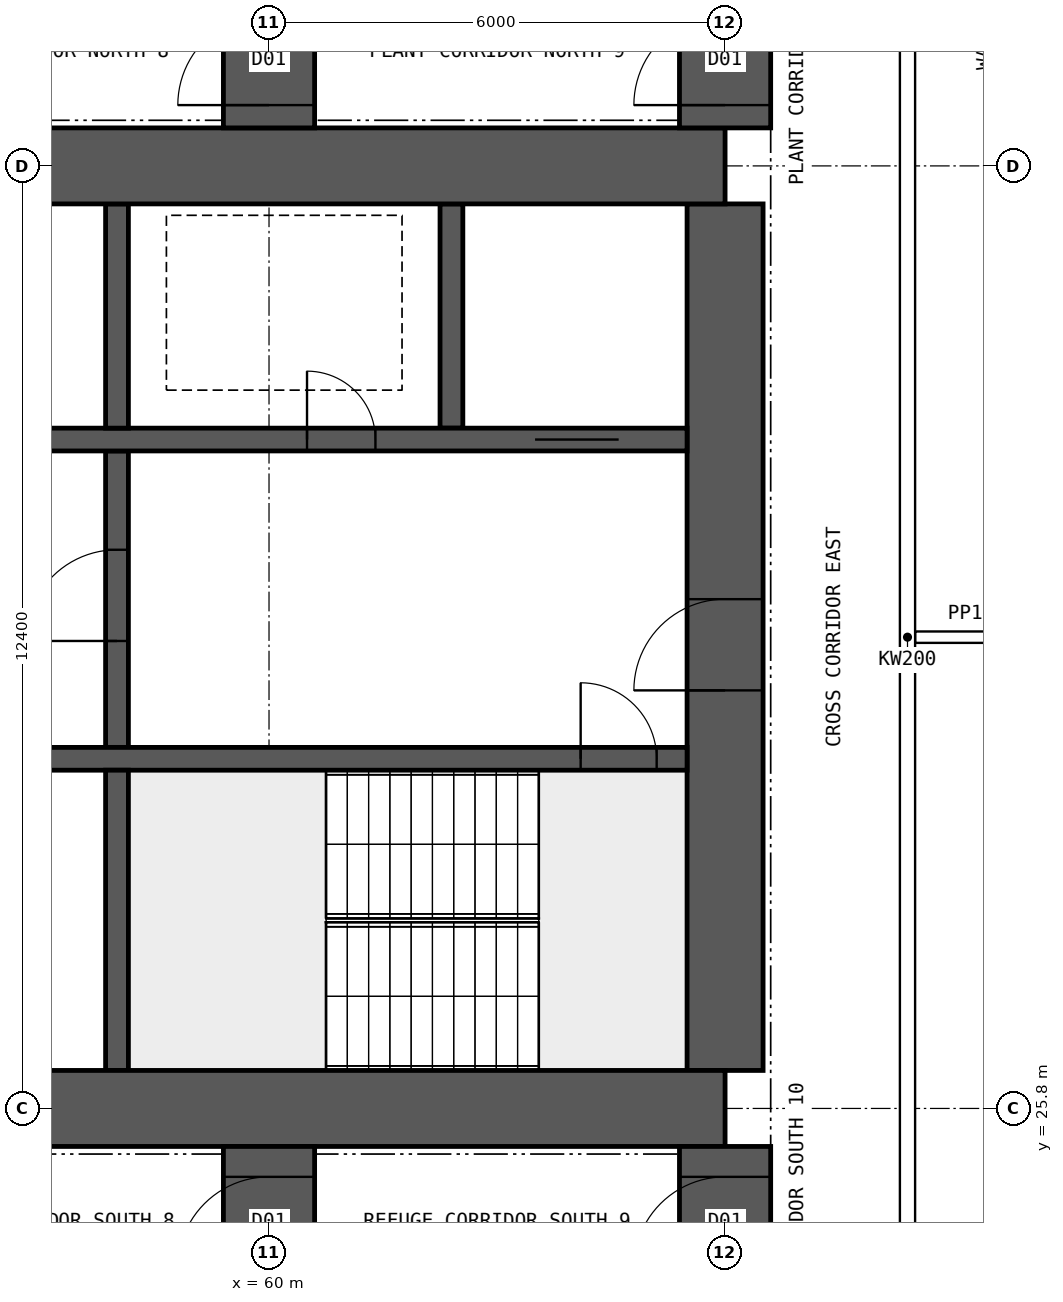
"""IFC4 building model, lengths in metres.
Left out: names, types, materials, properties, quantities, classifications, styles, units other than length and angle.
Written with IfcOpenShell. Run it as: python <this file> out.ifc"""

import sys

from ifc_helpers import new_model, si_unit, direction, frame, frame_2d, origin, place, context, subcontext, project, spatial, rectangle, extrude, element, fill, save


model = new_model("IFC4")
c1 = context("Model", 3, precision=1e-05, world=origin(), true_north=direction((0.0, 1.0)))
c2 = subcontext(c1, "Body", "Model", "MODEL_VIEW")
j1 = project(units=[si_unit("LENGTHUNIT", "METRE"), si_unit("PLANEANGLEUNIT", "RADIAN")], contexts=[c1])
p1 = place(None, origin())
s1 = spatial("IfcSite", under=j1, at=p1, CompositionType="ELEMENT")
p2 = place(p1, origin())
s2 = spatial("IfcBuilding", under=s1, at=p2, CompositionType="ELEMENT")
p3 = place(p2, frame((0.0, 0.0, 68.95)))
s3 = spatial("IfcBuildingStorey", under=s2, at=p3, CompositionType="ELEMENT", Elevation=68.95)
for number, where, z_axis, x_axis in (
    (1, (18.0, 25.8, 0.0), (0.0, 0.0, 1.0), (1.0, 0.0, 0.0)),
    (2, (18.0, 38.2, 0.0), (0.0, 0.0, 1.0), (1.0, 0.0, 0.0)),
):
    element("IfcWall", number, at=place(p3, frame(where, z_axis=z_axis, x_axis=x_axis)), inside=s3, PredefinedType="SHEAR", context=c2, shape_type="SweptSolid", body=[
        extrude(rectangle(XDim=48.0, YDim=1.0, at=frame_2d((24.0, 0.0))), origin(), (0.0, 0.0, 1.0), 7.2),
    ])
p4 = place(p3, frame((66.0, 26.3, 0.0), z_axis=(0.0, 0.0, 1.0), x_axis=(0.0, 1.0, 0.0)))
e3 = element("IfcWall", 3, at=p4, inside=s3, PredefinedType="SHEAR", context=c2, shape_type="SweptSolid", body=[
    extrude(rectangle(XDim=11.4, YDim=1.0, at=frame_2d((5.7, 0.0))), origin(), (0.0, 0.0, 1.0), 7.2),
])
p5 = place(p4, frame((5.0, 0.0, 0.0)))
e4 = element("IfcOpeningElement", 4, at=p5, cuts=e3, PredefinedType="OPENING", context=c2, shape_type="SweptSolid", body=[
    extrude(rectangle(XDim=1.2, YDim=2.1, at=frame_2d((0.6, 1.05))), frame((0.0, 0.51, 0.0), z_axis=(0.0, -1.0, 0.0), x_axis=(1.0, 0.0, 0.0)), (0.0, 0.0, 1.0), 1.02),
])
p6 = place(p3, frame((18.5, 30.4, 0.0), z_axis=(0.0, 0.0, 1.0), x_axis=(1.0, 0.0, 0.0)))
e5 = element("IfcWall", 5, at=p6, inside=s3, PredefinedType="SHEAR", context=c2, shape_type="SweptSolid", body=[
    extrude(rectangle(XDim=47.0, YDim=0.3, at=frame_2d((23.5, 0.0))), origin(), (0.0, 0.0, 1.0), 7.2),
])
p7 = place(p6, frame((0.4, 0.0, 0.0)))
e6 = element("IfcOpeningElement", 6, at=p7, cuts=e5, PredefinedType="OPENING", context=c2, shape_type="SweptSolid", body=[
    extrude(rectangle(XDim=1.0, YDim=2.1, at=frame_2d((0.5, 1.05))), frame((0.0, 0.16, 0.0), z_axis=(0.0, -1.0, 0.0), x_axis=(1.0, 0.0, 0.0)), (0.0, 0.0, 1.0), 0.32),
])
p8 = place(p6, frame((45.6, 0.0, 0.0)))
e7 = element("IfcOpeningElement", 7, at=p8, cuts=e5, PredefinedType="OPENING", context=c2, shape_type="SweptSolid", body=[
    extrude(rectangle(XDim=1.0, YDim=2.1, at=frame_2d((0.5, 1.05))), frame((0.0, 0.16, 0.0), z_axis=(0.0, -1.0, 0.0), x_axis=(1.0, 0.0, 0.0)), (0.0, 0.0, 1.0), 0.32),
])
p9 = place(p6, frame((30.117, 0.0, 0.0)))
e8 = element("IfcOpeningElement", 8, at=p9, cuts=e5, PredefinedType="OPENING", context=c2, shape_type="SweptSolid", body=[
    extrude(rectangle(XDim=1.1, YDim=2.1, at=frame_2d((0.55, 1.05))), frame((0.0, 0.16, 0.0), z_axis=(0.0, -1.0, 0.0), x_axis=(1.0, 0.0, 0.0)), (0.0, 0.0, 1.0), 0.32),
])
p10 = place(p6, frame((33.65, 0.0, 0.0)))
e9 = element("IfcOpeningElement", 9, at=p10, cuts=e5, PredefinedType="OPENING", context=c2, shape_type="SweptSolid", body=[
    extrude(rectangle(XDim=1.1, YDim=2.1, at=frame_2d((0.55, 1.05))), frame((0.0, 0.16, 0.0), z_axis=(0.0, -1.0, 0.0), x_axis=(1.0, 0.0, 0.0)), (0.0, 0.0, 1.0), 0.32),
])
p11 = place(p6, frame((37.183, 0.0, 0.0)))
e10 = element("IfcOpeningElement", 10, at=p11, cuts=e5, PredefinedType="OPENING", context=c2, shape_type="SweptSolid", body=[
    extrude(rectangle(XDim=1.1, YDim=2.1, at=frame_2d((0.55, 1.05))), frame((0.0, 0.16, 0.0), z_axis=(0.0, -1.0, 0.0), x_axis=(1.0, 0.0, 0.0)), (0.0, 0.0, 1.0), 0.32),
])
p12 = place(p3, frame((18.5, 34.6, 0.0), z_axis=(0.0, 0.0, 1.0), x_axis=(1.0, 0.0, 0.0)))
e11 = element("IfcWall", 11, at=p12, inside=s3, PredefinedType="SHEAR", context=c2, shape_type="SweptSolid", body=[
    extrude(rectangle(XDim=47.0, YDim=0.3, at=frame_2d((23.5, 0.0))), origin(), (0.0, 0.0, 1.0), 7.2),
])
p13 = place(p12, frame((0.9, 0.0, 0.0)))
e12 = element("IfcOpeningElement", 12, at=p13, cuts=e11, PredefinedType="OPENING", context=c2, shape_type="SweptSolid", body=[
    extrude(rectangle(XDim=1.1, YDim=2.1, at=frame_2d((0.55, 1.05))), frame((0.0, 0.16, 0.0), z_axis=(0.0, -1.0, 0.0), x_axis=(1.0, 0.0, 0.0)), (0.0, 0.0, 1.0), 0.32),
])
p14 = place(p12, frame((45.0, 0.0, 0.0)))
e13 = element("IfcOpeningElement", 13, at=p14, cuts=e11, PredefinedType="OPENING", context=c2, shape_type="SweptSolid", body=[
    extrude(rectangle(XDim=1.1, YDim=2.1, at=frame_2d((0.55, 1.05))), frame((0.0, 0.16, 0.0), z_axis=(0.0, -1.0, 0.0), x_axis=(1.0, 0.0, 0.0)), (0.0, 0.0, 1.0), 0.32),
])
p15 = place(p12, frame((4.1, 0.0, 0.0)))
e14 = element("IfcOpeningElement", 14, at=p15, cuts=e11, PredefinedType="OPENING", context=c2, shape_type="SweptSolid", body=[
    extrude(rectangle(XDim=0.9, YDim=2.1, at=frame_2d((0.45, 1.05))), frame((0.0, 0.16, 0.0), z_axis=(0.0, -1.0, 0.0), x_axis=(1.0, 0.0, 0.0)), (0.0, 0.0, 1.0), 0.32),
])
p16 = place(p12, frame((42.0, 0.0, 0.0)))
e15 = element("IfcOpeningElement", 15, at=p16, cuts=e11, PredefinedType="OPENING", context=c2, shape_type="SweptSolid", body=[
    extrude(rectangle(XDim=0.9, YDim=2.1, at=frame_2d((0.45, 1.05))), frame((0.0, 0.16, 0.0), z_axis=(0.0, -1.0, 0.0), x_axis=(1.0, 0.0, 0.0)), (0.0, 0.0, 1.0), 0.32),
])
p17 = place(p12, frame((8.875, 0.0, 0.0)))
e16 = element("IfcOpeningElement", 16, at=p17, cuts=e11, PredefinedType="OPENING", context=c2, shape_type="SweptSolid", body=[
    extrude(rectangle(XDim=0.9, YDim=2.1, at=frame_2d((0.45, 1.05))), frame((0.0, 0.16, 0.0), z_axis=(0.0, -1.0, 0.0), x_axis=(1.0, 0.0, 0.0)), (0.0, 0.0, 1.0), 0.32),
])
p18 = place(p12, frame((12.849, 0.0, 0.0)))
e17 = element("IfcOpeningElement", 17, at=p18, cuts=e11, PredefinedType="OPENING", context=c2, shape_type="SweptSolid", body=[
    extrude(rectangle(XDim=0.9, YDim=2.1, at=frame_2d((0.45, 1.05))), frame((0.0, 0.16, 0.0), z_axis=(0.0, -1.0, 0.0), x_axis=(1.0, 0.0, 0.0)), (0.0, 0.0, 1.0), 0.32),
])
p19 = place(p12, frame((16.496, 0.0, 0.0)))
e18 = element("IfcOpeningElement", 18, at=p19, cuts=e11, PredefinedType="OPENING", context=c2, shape_type="SweptSolid", body=[
    extrude(rectangle(XDim=0.9, YDim=2.1, at=frame_2d((0.45, 1.05))), frame((0.0, 0.16, 0.0), z_axis=(0.0, -1.0, 0.0), x_axis=(1.0, 0.0, 0.0)), (0.0, 0.0, 1.0), 0.32),
])
p20 = place(p12, frame((20.255, 0.0, 0.0)))
e19 = element("IfcOpeningElement", 19, at=p20, cuts=e11, PredefinedType="OPENING", context=c2, shape_type="SweptSolid", body=[
    extrude(rectangle(XDim=0.9, YDim=2.1, at=frame_2d((0.45, 1.05))), frame((0.0, 0.16, 0.0), z_axis=(0.0, -1.0, 0.0), x_axis=(1.0, 0.0, 0.0)), (0.0, 0.0, 1.0), 0.32),
])
p21 = place(p12, frame((24.661, 0.0, 0.0)))
e20 = element("IfcOpeningElement", 20, at=p21, cuts=e11, PredefinedType="OPENING", context=c2, shape_type="SweptSolid", body=[
    extrude(rectangle(XDim=0.9, YDim=2.1, at=frame_2d((0.45, 1.05))), frame((0.0, 0.16, 0.0), z_axis=(0.0, -1.0, 0.0), x_axis=(1.0, 0.0, 0.0)), (0.0, 0.0, 1.0), 0.32),
])
p22 = place(p12, frame((27.458, 0.0, 0.0)))
e21 = element("IfcOpeningElement", 21, at=p22, cuts=e11, PredefinedType="OPENING", context=c2, shape_type="SweptSolid", body=[
    extrude(rectangle(XDim=0.9, YDim=2.1, at=frame_2d((0.45, 1.05))), frame((0.0, 0.16, 0.0), z_axis=(0.0, -1.0, 0.0), x_axis=(1.0, 0.0, 0.0)), (0.0, 0.0, 1.0), 0.32),
])
p23 = place(p12, frame((29.831, 0.0, 0.0)))
e22 = element("IfcOpeningElement", 22, at=p23, cuts=e11, PredefinedType="OPENING", context=c2, shape_type="SweptSolid", body=[
    extrude(rectangle(XDim=0.9, YDim=2.1, at=frame_2d((0.45, 1.05))), frame((0.0, 0.16, 0.0), z_axis=(0.0, -1.0, 0.0), x_axis=(1.0, 0.0, 0.0)), (0.0, 0.0, 1.0), 0.32),
])
p24 = place(p12, frame((33.68, 0.0, 0.0)))
e23 = element("IfcOpeningElement", 23, at=p24, cuts=e11, PredefinedType="OPENING", context=c2, shape_type="SweptSolid", body=[
    extrude(rectangle(XDim=0.9, YDim=2.1, at=frame_2d((0.45, 1.05))), frame((0.0, 0.16, 0.0), z_axis=(0.0, -1.0, 0.0), x_axis=(1.0, 0.0, 0.0)), (0.0, 0.0, 1.0), 0.32),
])
p25 = place(p12, frame((37.429, 0.0, 0.0)))
e24 = element("IfcOpeningElement", 24, at=p25, cuts=e11, PredefinedType="OPENING", context=c2, shape_type="SweptSolid", body=[
    extrude(rectangle(XDim=0.9, YDim=2.1, at=frame_2d((0.45, 1.05))), frame((0.0, 0.16, 0.0), z_axis=(0.0, -1.0, 0.0), x_axis=(1.0, 0.0, 0.0)), (0.0, 0.0, 1.0), 0.32),
])
p26 = place(p3, frame((58.0, 26.3, 0.0), z_axis=(0.0, 0.0, 1.0), x_axis=(0.0, 1.0, 0.0)))
e25 = element("IfcWall", 25, at=p26, inside=s3, PredefinedType="SHEAR", context=c2, shape_type="SweptSolid", body=[
    extrude(rectangle(XDim=3.95, YDim=0.3, at=frame_2d((1.975, 0.0))), origin(), (0.0, 0.0, 1.0), 7.2),
])
p27 = place(p3, frame((58.0, 30.55, 0.0), z_axis=(0.0, 0.0, 1.0), x_axis=(0.0, 1.0, 0.0)))
e26 = element("IfcWall", 26, at=p27, inside=s3, PredefinedType="SHEAR", context=c2, shape_type="SweptSolid", body=[
    extrude(rectangle(XDim=3.9, YDim=0.3, at=frame_2d((1.95, 0.0))), origin(), (0.0, 0.0, 1.0), 7.2),
])
p28 = place(p27, frame((1.4, 0.0, 0.0)))
e27 = element("IfcOpeningElement", 27, at=p28, cuts=e26, PredefinedType="OPENING", context=c2, shape_type="SweptSolid", body=[
    extrude(rectangle(XDim=1.2, YDim=2.1, at=frame_2d((0.6, 1.05))), frame((0.0, 0.16, 0.0), z_axis=(0.0, -1.0, 0.0), x_axis=(1.0, 0.0, 0.0)), (0.0, 0.0, 1.0), 0.32),
])
for number, where, z_axis, x_axis in (
    (28, (62.4, 34.75, 0.0), (0.0, 0.0, 1.0), (0.0, 1.0, 0.0)),
    (29, (58.0, 34.75, 0.0), (0.0, 0.0, 1.0), (0.0, 1.0, 0.0)),
):
    element("IfcWall", number, at=place(p3, frame(where, z_axis=z_axis, x_axis=x_axis)), inside=s3, PredefinedType="SHEAR", context=c2, shape_type="SweptSolid", body=[
        extrude(rectangle(XDim=2.95, YDim=0.3, at=frame_2d((1.475, 0.0))), origin(), (0.0, 0.0, 1.0), 7.2),
    ])
p29 = place(p3, frame((60.0, 7.7, 0.0), z_axis=(0.0, 0.0, 1.0), x_axis=(0.0, 1.0, 0.0)))
e30 = element("IfcWall", 30, at=p29, inside=s3, PredefinedType="SHEAR", context=c2, shape_type="SweptSolid", body=[
    extrude(rectangle(XDim=17.6, YDim=1.2, at=frame_2d((8.8, 0.0))), origin(), (0.0, 0.0, 1.0), 7.2),
])
p30 = place(p29, frame((16.0, 0.0, 0.0)))
e31 = element("IfcOpeningElement", 31, at=p30, cuts=e30, PredefinedType="OPENING", context=c2, shape_type="SweptSolid", body=[
    extrude(rectangle(XDim=1.2, YDim=2.1, at=frame_2d((0.6, 1.05))), frame((0.0, 0.61, 0.0), z_axis=(0.0, -1.0, 0.0), x_axis=(1.0, 0.0, 0.0)), (0.0, 0.0, 1.0), 1.22),
])
p31 = place(p3, frame((60.0, 38.7, 0.0), z_axis=(0.0, 0.0, 1.0), x_axis=(0.0, 1.0, 0.0)))
e32 = element("IfcWall", 32, at=p31, inside=s3, PredefinedType="SHEAR", context=c2, shape_type="SweptSolid", body=[
    extrude(rectangle(XDim=17.6, YDim=1.2, at=frame_2d((8.8, 0.0))), origin(), (0.0, 0.0, 1.0), 7.2),
])
p32 = place(p31, frame((0.3, 0.0, 0.0)))
e33 = element("IfcOpeningElement", 33, at=p32, cuts=e32, PredefinedType="OPENING", context=c2, shape_type="SweptSolid", body=[
    extrude(rectangle(XDim=1.2, YDim=2.1, at=frame_2d((0.6, 1.05))), frame((0.0, 0.61, 0.0), z_axis=(0.0, -1.0, 0.0), x_axis=(1.0, 0.0, 0.0)), (0.0, 0.0, 1.0), 1.22),
])
p33 = place(p3, frame((66.0, 7.7, 0.0), z_axis=(0.0, 0.0, 1.0), x_axis=(0.0, 1.0, 0.0)))
e34 = element("IfcWall", 34, at=p33, inside=s3, PredefinedType="SHEAR", context=c2, shape_type="SweptSolid", body=[
    extrude(rectangle(XDim=17.6, YDim=1.2, at=frame_2d((8.8, 0.0))), origin(), (0.0, 0.0, 1.0), 7.2),
])
p34 = place(p33, frame((16.0, 0.0, 0.0)))
e35 = element("IfcOpeningElement", 35, at=p34, cuts=e34, PredefinedType="OPENING", context=c2, shape_type="SweptSolid", body=[
    extrude(rectangle(XDim=1.2, YDim=2.1, at=frame_2d((0.6, 1.05))), frame((0.0, 0.61, 0.0), z_axis=(0.0, -1.0, 0.0), x_axis=(1.0, 0.0, 0.0)), (0.0, 0.0, 1.0), 1.22),
])
p35 = place(p3, frame((66.0, 38.7, 0.0), z_axis=(0.0, 0.0, 1.0), x_axis=(0.0, 1.0, 0.0)))
e36 = element("IfcWall", 36, at=p35, inside=s3, PredefinedType="SHEAR", context=c2, shape_type="SweptSolid", body=[
    extrude(rectangle(XDim=17.6, YDim=1.2, at=frame_2d((8.8, 0.0))), origin(), (0.0, 0.0, 1.0), 7.2),
])
p36 = place(p35, frame((0.3, 0.0, 0.0)))
e37 = element("IfcOpeningElement", 37, at=p36, cuts=e36, PredefinedType="OPENING", context=c2, shape_type="SweptSolid", body=[
    extrude(rectangle(XDim=1.2, YDim=2.1, at=frame_2d((0.6, 1.05))), frame((0.0, 0.61, 0.0), z_axis=(0.0, -1.0, 0.0), x_axis=(1.0, 0.0, 0.0)), (0.0, 0.0, 1.0), 1.22),
])
p37 = place(p3, frame((68.4, 23.4, 0.0), z_axis=(0.0, 0.0, 1.0), x_axis=(0.0, 1.0, 0.0)))
e38 = element("IfcWall", 38, at=p37, inside=s3, PredefinedType="SOLIDWALL", context=c2, shape_type="SweptSolid", body=[
    extrude(rectangle(XDim=17.2, YDim=0.2, at=frame_2d((8.6, 0.0))), origin(), (0.0, 0.0, 1.0), 6.9),
])
p38 = place(p3, frame((68.5, 32.0, 0.0), z_axis=(0.0, 0.0, 1.0), x_axis=(1.0, 0.0, 0.0)))
e39 = element("IfcWall", 39, at=p38, inside=s3, PredefinedType="PARTITIONING", context=c2, shape_type="SweptSolid", body=[
    extrude(rectangle(XDim=3.0, YDim=0.15, at=frame_2d((1.5, 0.0))), origin(), (0.0, 0.0, 1.0), 6.9),
])
p39 = place(p5, origin())
e40 = element("IfcDoor", 40, at=p39, inside=s3, OperationType="SINGLE_SWING_LEFT", PredefinedType="DOOR", context=c2, shape_type="SweptSolid", body=[
    extrude(rectangle(XDim=1.2, YDim=2.1, at=frame_2d((0.6, 1.05))), frame((0.0, 0.025, 0.0), z_axis=(0.0, -1.0, 0.0), x_axis=(1.0, 0.0, 0.0)), (0.0, 0.0, 1.0), 0.05),
])
fill(e4, e40)
p40 = place(p8, origin())
e41 = element("IfcDoor", 41, at=p40, inside=s3, OperationType="SINGLE_SWING_LEFT", PredefinedType="DOOR", context=c2, shape_type="SweptSolid", body=[
    extrude(rectangle(XDim=1.0, YDim=2.1, at=frame_2d((0.5, 1.05))), frame((0.0, 0.025, 0.0), z_axis=(0.0, -1.0, 0.0), x_axis=(1.0, 0.0, 0.0)), (0.0, 0.0, 1.0), 0.05),
])
fill(e7, e41)
p41 = place(p14, origin())
e42 = element("IfcDoor", 42, at=p41, inside=s3, OperationType="DOUBLE_DOOR_SLIDING", PredefinedType="DOOR", context=c2, shape_type="SweptSolid", body=[
    extrude(rectangle(XDim=1.1, YDim=2.1, at=frame_2d((0.55, 1.05))), frame((0.0, 0.025, 0.0), z_axis=(0.0, -1.0, 0.0), x_axis=(1.0, 0.0, 0.0)), (0.0, 0.0, 1.0), 0.05),
])
fill(e13, e42)
p42 = place(p16, origin())
e43 = element("IfcDoor", 43, at=p42, inside=s3, OperationType="SINGLE_SWING_LEFT", PredefinedType="DOOR", context=c2, shape_type="SweptSolid", body=[
    extrude(rectangle(XDim=0.9, YDim=2.1, at=frame_2d((0.45, 1.05))), frame((0.0, 0.025, 0.0), z_axis=(0.0, -1.0, 0.0), x_axis=(1.0, 0.0, 0.0)), (0.0, 0.0, 1.0), 0.05),
])
fill(e15, e43)
p43 = place(p28, origin())
e44 = element("IfcDoor", 44, at=p43, inside=s3, OperationType="SINGLE_SWING_LEFT", PredefinedType="DOOR", context=c2, shape_type="SweptSolid", body=[
    extrude(rectangle(XDim=1.2, YDim=2.1, at=frame_2d((0.6, 1.05))), frame((0.0, 0.025, 0.0), z_axis=(0.0, -1.0, 0.0), x_axis=(1.0, 0.0, 0.0)), (0.0, 0.0, 1.0), 0.05),
])
fill(e27, e44)
p44 = place(p30, origin())
e45 = element("IfcDoor", 45, at=p44, inside=s3, OperationType="SINGLE_SWING_LEFT", PredefinedType="DOOR", context=c2, shape_type="SweptSolid", body=[
    extrude(rectangle(XDim=1.2, YDim=2.1, at=frame_2d((0.6, 1.05))), frame((0.0, 0.025, 0.0), z_axis=(0.0, -1.0, 0.0), x_axis=(1.0, 0.0, 0.0)), (0.0, 0.0, 1.0), 0.05),
])
fill(e31, e45)
p45 = place(p34, origin())
e46 = element("IfcDoor", 46, at=p45, inside=s3, OperationType="SINGLE_SWING_LEFT", PredefinedType="DOOR", context=c2, shape_type="SweptSolid", body=[
    extrude(rectangle(XDim=1.2, YDim=2.1, at=frame_2d((0.6, 1.05))), frame((0.0, 0.025, 0.0), z_axis=(0.0, -1.0, 0.0), x_axis=(1.0, 0.0, 0.0)), (0.0, 0.0, 1.0), 0.05),
])
fill(e35, e46)
p46 = place(p32, origin())
e47 = element("IfcDoor", 47, at=p46, inside=s3, OperationType="SINGLE_SWING_LEFT", PredefinedType="DOOR", context=c2, shape_type="SweptSolid", body=[
    extrude(rectangle(XDim=1.2, YDim=2.1, at=frame_2d((0.6, 1.05))), frame((0.0, 0.025, 0.0), z_axis=(0.0, -1.0, 0.0), x_axis=(1.0, 0.0, 0.0)), (0.0, 0.0, 1.0), 0.05),
])
fill(e33, e47)
p47 = place(p36, origin())
e48 = element("IfcDoor", 48, at=p47, inside=s3, OperationType="SINGLE_SWING_LEFT", PredefinedType="DOOR", context=c2, shape_type="SweptSolid", body=[
    extrude(rectangle(XDim=1.2, YDim=2.1, at=frame_2d((0.6, 1.05))), frame((0.0, 0.025, 0.0), z_axis=(0.0, -1.0, 0.0), x_axis=(1.0, 0.0, 0.0)), (0.0, 0.0, 1.0), 0.05),
])
fill(e37, e48)
save(model, sys.argv[1])
